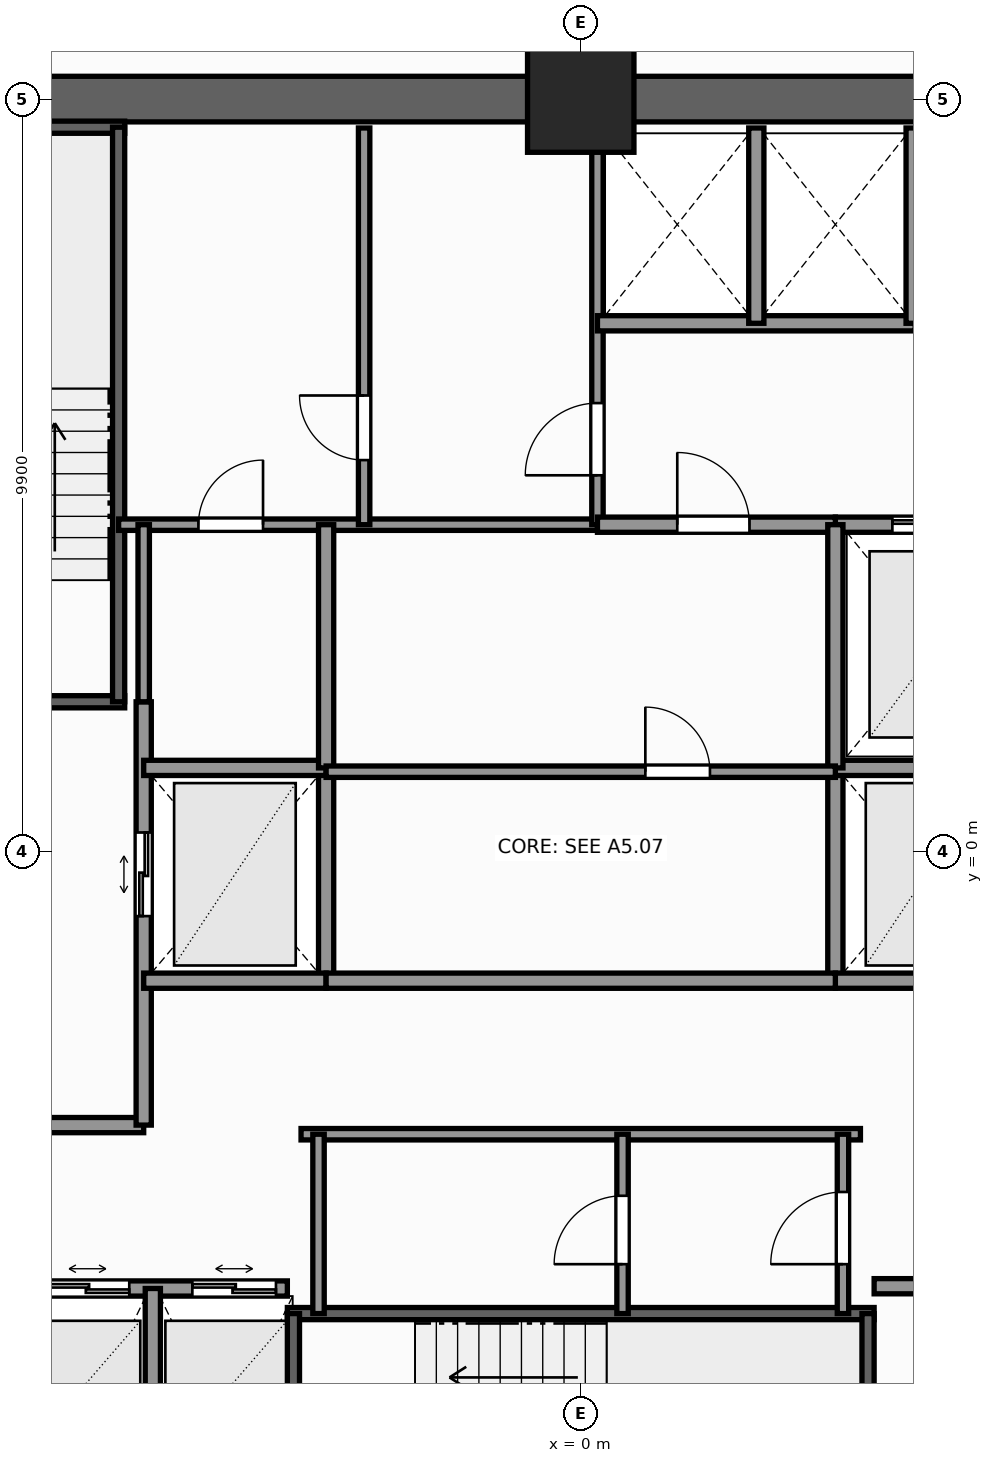
"""IFC4 building model, lengths in metres.
Left out: names, types, materials, properties, quantities, classifications, styles, units other than length and angle.
Written with IfcOpenShell. Run it as: python <this file> out.ifc"""

import sys

from ifc_helpers import new_model, si_unit, direction, frame, frame_2d, origin, origin_2d, place, context, subcontext, project, spatial, rectangle, extrude, element, fill, save


model = new_model("IFC4")
c1 = context("Model", 3, precision=1e-05, world=origin(), true_north=direction((0.0, 1.0)))
c2 = subcontext(c1, "Body", "Model", "MODEL_VIEW")
j1 = project(units=[si_unit("LENGTHUNIT", "METRE"), si_unit("PLANEANGLEUNIT", "RADIAN")], contexts=[c1])
p1 = place(None, origin())
s1 = spatial("IfcSite", under=j1, at=p1, CompositionType="ELEMENT")
p2 = place(p1, origin())
s2 = spatial("IfcBuilding", under=s1, at=p2, CompositionType="ELEMENT")
p3 = place(p2, frame((0.0, 0.0, 92.0)))
s3 = spatial("IfcBuildingStorey", under=s2, at=p3, CompositionType="ELEMENT", Elevation=92.0)
p4 = place(p3, frame((-10.2, 9.9, 0.0), z_axis=(0.0, 0.0, 1.0), x_axis=(1.0, 0.0, 0.0)))
e1 = element("IfcWall", 1, at=p4, inside=s3, PredefinedType="SHEAR", context=c2, shape_type="SweptSolid", body=[
    extrude(rectangle(XDim=14.62, YDim=0.6, at=frame_2d((7.31, 0.0))), origin(), (0.0, 0.0, 1.0), 3.3),
])
p5 = place(p3, frame((0.0, 9.9, 0.0), z_axis=(0.0, 0.0, 1.0), x_axis=(1.0, 0.0, 0.0)))
e2 = element("IfcColumn", 2, at=p5, inside=s3, PredefinedType="COLUMN", context=c2, shape_type="SweptSolid", body=[
    extrude(rectangle(XDim=1.4, YDim=1.4, at=origin_2d()), origin(), (0.0, 0.0, 1.0), 3.3),
])
p6 = place(p3, frame((-9.52, 1.97, 0.0), z_axis=(0.0, 0.0, 1.0), x_axis=(1.0, 0.0, 0.0)))
e3 = element("IfcWall", 3, at=p6, inside=s3, PredefinedType="SHEAR", context=c2, shape_type="SweptSolid", body=[
    extrude(rectangle(XDim=3.52, YDim=0.16, at=frame_2d((1.76, 0.0))), origin(), (0.0, 0.0, 1.0), 3.3),
])
p7 = place(p6, frame((1.15, 0.0, 0.0)))
e4 = element("IfcOpeningElement", 4, at=p7, cuts=e3, PredefinedType="OPENING", context=c2, shape_type="SweptSolid", body=[
    extrude(rectangle(XDim=1.1, YDim=2.2, at=frame_2d((0.55, 1.1))), frame((0.0, 0.09, 0.0), z_axis=(0.0, -1.0, 0.0), x_axis=(1.0, 0.0, 0.0)), (0.0, 0.0, 1.0), 0.18),
])
p8 = place(p3, frame((-9.52, 9.53, 0.0), z_axis=(0.0, 0.0, 1.0), x_axis=(1.0, 0.0, 0.0)))
e5 = element("IfcWall", 5, at=p8, inside=s3, PredefinedType="SHEAR", context=c2, shape_type="SweptSolid", body=[
    extrude(rectangle(XDim=3.52, YDim=0.16, at=frame_2d((1.76, 0.0))), origin(), (0.0, 0.0, 1.0), 3.3),
])
p9 = place(p3, frame((-6.08, 1.97, 0.0), z_axis=(0.0, 0.0, 1.0), x_axis=(0.0, 1.0, 0.0)))
e6 = element("IfcWall", 6, at=p9, inside=s3, PredefinedType="SHEAR", context=c2, shape_type="SweptSolid", body=[
    extrude(rectangle(XDim=7.56, YDim=0.16, at=frame_2d((3.78, 0.0))), origin(), (0.0, 0.0, 1.0), 3.3),
])
p10 = place(p3, frame((-3.86, -6.08, 0.0), z_axis=(0.0, 0.0, 1.0), x_axis=(1.0, 0.0, 0.0)))
e7 = element("IfcWall", 7, at=p10, inside=s3, PredefinedType="SHEAR", context=c2, shape_type="SweptSolid", body=[
    extrude(rectangle(XDim=7.72, YDim=0.16, at=frame_2d((3.86, 0.0))), origin(), (0.0, 0.0, 1.0), 3.3),
])
for number, where, z_axis, x_axis in (
    (8, (-3.78, -9.43, 0.0), (0.0, 0.0, 1.0), (0.0, 1.0, 0.0)),
    (9, (3.78, -9.43, 0.0), (0.0, 0.0, 1.0), (0.0, 1.0, 0.0)),
):
    element("IfcWall", number, at=place(p3, frame(where, z_axis=z_axis, x_axis=x_axis)), inside=s3, PredefinedType="SHEAR", context=c2, shape_type="SweptSolid", body=[
        extrude(rectangle(XDim=3.35, YDim=0.16, at=frame_2d((1.675, 0.0))), origin(), (0.0, 0.0, 1.0), 3.3),
    ])
p11 = place(p3, frame((-9.52, -3.6, 0.0), z_axis=(0.0, 0.0, 1.0), x_axis=(1.0, 0.0, 0.0)))
e10 = element("IfcWall", 10, at=p11, inside=s3, PredefinedType="SOLIDWALL", context=c2, shape_type="SweptSolid", body=[
    extrude(rectangle(XDim=3.77, YDim=0.2, at=frame_2d((1.885, 0.0))), origin(), (0.0, 0.0, 1.0), 3.08),
])
p12 = place(p11, frame((1.15, 0.0, 0.0)))
e11 = element("IfcOpeningElement", 11, at=p12, cuts=e10, PredefinedType="OPENING", context=c2, shape_type="SweptSolid", body=[
    extrude(rectangle(XDim=0.95, YDim=2.06, at=frame_2d((0.475, 1.03))), frame((0.0, 0.11, 0.0), z_axis=(0.0, -1.0, 0.0), x_axis=(1.0, 0.0, 0.0)), (0.0, 0.0, 1.0), 0.22),
])
p13 = place(p3, frame((-5.75, -3.6, 0.0), z_axis=(0.0, 0.0, 1.0), x_axis=(0.0, 1.0, 0.0)))
e12 = element("IfcWall", 12, at=p13, inside=s3, PredefinedType="SOLIDWALL", context=c2, shape_type="SweptSolid", body=[
    extrude(rectangle(XDim=5.57, YDim=0.2, at=frame_2d((2.785, 0.0))), origin(), (0.0, 0.0, 1.0), 3.08),
])
p14 = place(p13, frame((2.75, 0.0, 0.0)))
e13 = element("IfcOpeningElement", 13, at=p14, cuts=e12, PredefinedType="OPENING", context=c2, shape_type="SweptSolid", body=[
    extrude(rectangle(XDim=1.1, YDim=2.2, at=frame_2d((0.55, 1.1))), frame((0.0, 0.11, 0.0), z_axis=(0.0, -1.0, 0.0), x_axis=(1.0, 0.0, 0.0)), (0.0, 0.0, 1.0), 0.22),
])
p15 = place(p3, frame((-3.35, -1.7, 0.0), z_axis=(0.0, 0.0, 1.0), x_axis=(0.0, 1.0, 0.0)))
e14 = element("IfcWall", 14, at=p15, inside=s3, PredefinedType="SOLIDWALL", context=c2, shape_type="SweptSolid", body=[
    extrude(rectangle(XDim=2.8, YDim=0.2, at=frame_2d((1.4, 0.0))), origin(), (0.0, 0.0, 1.0), 3.08),
])
for number, where, z_axis, x_axis in (
    (15, (-5.75, -1.7, 0.0), (0.0, 0.0, 1.0), (1.0, 0.0, 0.0)),
    (16, (-5.75, 1.1, 0.0), (0.0, 0.0, 1.0), (1.0, 0.0, 0.0)),
):
    element("IfcWall", number, at=place(p3, frame(where, z_axis=z_axis, x_axis=x_axis)), inside=s3, PredefinedType="SOLIDWALL", context=c2, shape_type="SweptSolid", body=[
        extrude(rectangle(XDim=2.4, YDim=0.2, at=frame_2d((1.2, 0.0))), origin(), (0.0, 0.0, 1.0), 3.08),
    ])
p16 = place(p3, frame((3.35, -1.7, 0.0), z_axis=(0.0, 0.0, 1.0), x_axis=(0.0, 1.0, 0.0)))
e17 = element("IfcWall", 17, at=p16, inside=s3, PredefinedType="SOLIDWALL", context=c2, shape_type="SweptSolid", body=[
    extrude(rectangle(XDim=2.8, YDim=0.2, at=frame_2d((1.4, 0.0))), origin(), (0.0, 0.0, 1.0), 3.08),
])
for number, where, z_axis, x_axis in (
    (18, (3.35, -1.7, 0.0), (0.0, 0.0, 1.0), (1.0, 0.0, 0.0)),
    (19, (3.35, 1.1, 0.0), (0.0, 0.0, 1.0), (1.0, 0.0, 0.0)),
):
    element("IfcWall", number, at=place(p3, frame(where, z_axis=z_axis, x_axis=x_axis)), inside=s3, PredefinedType="SOLIDWALL", context=c2, shape_type="SweptSolid", body=[
        extrude(rectangle(XDim=2.4, YDim=0.2, at=frame_2d((1.2, 0.0))), origin(), (0.0, 0.0, 1.0), 3.08),
    ])
p17 = place(p3, frame((3.35, 4.3, 0.0), z_axis=(0.0, 0.0, 1.0), x_axis=(1.0, 0.0, 0.0)))
e20 = element("IfcWall", 20, at=p17, inside=s3, PredefinedType="SOLIDWALL", context=c2, shape_type="SweptSolid", body=[
    extrude(rectangle(XDim=2.73, YDim=0.2, at=frame_2d((1.365, 0.0))), origin(), (0.0, 0.0, 1.0), 3.08),
])
p18 = place(p17, frame((0.75, 0.0, 0.0)))
e21 = element("IfcOpeningElement", 21, at=p18, cuts=e20, PredefinedType="OPENING", context=c2, shape_type="SweptSolid", body=[
    extrude(rectangle(XDim=1.2, YDim=2.25, at=frame_2d((0.6, 1.125))), frame((0.0, 0.11, 0.0), z_axis=(0.0, -1.0, 0.0), x_axis=(1.0, 0.0, 0.0)), (0.0, 0.0, 1.0), 0.22),
])
p19 = place(p3, frame((-6.08, 4.3, 0.0), z_axis=(0.0, 0.0, 1.0), x_axis=(1.0, 0.0, 0.0)))
e22 = element("IfcWall", 22, at=p19, inside=s3, PredefinedType="PARTITIONING", context=c2, shape_type="SweptSolid", body=[
    extrude(rectangle(XDim=6.3, YDim=0.15, at=frame_2d((3.15, 0.0))), origin(), (0.0, 0.0, 1.0), 3.08),
])
p20 = place(p19, frame((1.05, 0.0, 0.0)))
e23 = element("IfcOpeningElement", 23, at=p20, cuts=e22, PredefinedType="OPENING", context=c2, shape_type="SweptSolid", body=[
    extrude(rectangle(XDim=0.85, YDim=2.03, at=frame_2d((0.425, 1.015))), frame((0.0, 0.085, 0.0), z_axis=(0.0, -1.0, 0.0), x_axis=(1.0, 0.0, 0.0)), (0.0, 0.0, 1.0), 0.17),
])
p21 = place(p3, frame((0.22, 4.3, 0.0), z_axis=(0.0, 0.0, 1.0), x_axis=(0.0, 1.0, 0.0)))
e24 = element("IfcWall", 24, at=p21, inside=s3, PredefinedType="PARTITIONING", context=c2, shape_type="SweptSolid", body=[
    extrude(rectangle(XDim=5.22, YDim=0.15, at=frame_2d((2.61, 0.0))), origin(), (0.0, 0.0, 1.0), 3.08),
])
p22 = place(p21, frame((0.65, 0.0, 0.0)))
e25 = element("IfcOpeningElement", 25, at=p22, cuts=e24, PredefinedType="OPENING", context=c2, shape_type="SweptSolid", body=[
    extrude(rectangle(XDim=0.95, YDim=2.06, at=frame_2d((0.475, 1.03))), frame((0.0, 0.085, 0.0), z_axis=(0.0, -1.0, 0.0), x_axis=(1.0, 0.0, 0.0)), (0.0, 0.0, 1.0), 0.17),
])
p23 = place(p3, frame((-2.85, 4.3, 0.0), z_axis=(0.0, 0.0, 1.0), x_axis=(0.0, 1.0, 0.0)))
e26 = element("IfcWall", 26, at=p23, inside=s3, PredefinedType="PARTITIONING", context=c2, shape_type="SweptSolid", body=[
    extrude(rectangle(XDim=5.22, YDim=0.15, at=frame_2d((2.61, 0.0))), origin(), (0.0, 0.0, 1.0), 3.08),
])
p24 = place(p23, frame((0.85, 0.0, 0.0)))
e27 = element("IfcOpeningElement", 27, at=p24, cuts=e26, PredefinedType="OPENING", context=c2, shape_type="SweptSolid", body=[
    extrude(rectangle(XDim=0.85, YDim=2.03, at=frame_2d((0.425, 1.015))), frame((0.0, 0.085, 0.0), z_axis=(0.0, -1.0, 0.0), x_axis=(1.0, 0.0, 0.0)), (0.0, 0.0, 1.0), 0.17),
])
p25 = place(p3, frame((0.22, 6.95, 0.0), z_axis=(0.0, 0.0, 1.0), x_axis=(1.0, 0.0, 0.0)))
e28 = element("IfcWall", 28, at=p25, inside=s3, PredefinedType="SOLIDWALL", context=c2, shape_type="SweptSolid", body=[
    extrude(rectangle(XDim=4.18, YDim=0.2, at=frame_2d((2.09, 0.0))), origin(), (0.0, 0.0, 1.0), 3.08),
])
for number, where, z_axis, x_axis in (
    (29, (4.38, 6.95, 0.0), (0.0, 0.0, 1.0), (0.0, 1.0, 0.0)),
    (30, (2.31, 6.95, 0.0), (0.0, 0.0, 1.0), (0.0, 1.0, 0.0)),
):
    element("IfcWall", number, at=place(p3, frame(where, z_axis=z_axis, x_axis=x_axis)), inside=s3, PredefinedType="SOLIDWALL", context=c2, shape_type="SweptSolid", body=[
        extrude(rectangle(XDim=2.57, YDim=0.2, at=frame_2d((1.285, 0.0))), origin(), (0.0, 0.0, 1.0), 3.08),
    ])
p26 = place(p3, frame((-9.52, -5.75, 0.0), z_axis=(0.0, 0.0, 1.0), x_axis=(1.0, 0.0, 0.0)))
e31 = element("IfcWall", 31, at=p26, inside=s3, PredefinedType="SOLIDWALL", context=c2, shape_type="SweptSolid", body=[
    extrude(rectangle(XDim=5.66, YDim=0.2, at=frame_2d((2.83, 0.0))), origin(), (0.0, 0.0, 1.0), 3.08),
])
p27 = place(p26, frame((0.55, 0.0, 0.0)))
e32 = element("IfcOpeningElement", 32, at=p27, cuts=e31, PredefinedType="OPENING", context=c2, shape_type="SweptSolid", body=[
    extrude(rectangle(XDim=1.1, YDim=2.2, at=frame_2d((0.55, 1.1))), frame((0.0, 0.11, 0.0), z_axis=(0.0, -1.0, 0.0), x_axis=(1.0, 0.0, 0.0)), (0.0, 0.0, 1.0), 0.22),
])
p28 = place(p26, frame((2.48, 0.0, 0.0)))
e33 = element("IfcOpeningElement", 33, at=p28, cuts=e31, PredefinedType="OPENING", context=c2, shape_type="SweptSolid", body=[
    extrude(rectangle(XDim=1.1, YDim=2.2, at=frame_2d((0.55, 1.1))), frame((0.0, 0.11, 0.0), z_axis=(0.0, -1.0, 0.0), x_axis=(1.0, 0.0, 0.0)), (0.0, 0.0, 1.0), 0.22),
])
p29 = place(p26, frame((4.41, 0.0, 0.0)))
e34 = element("IfcOpeningElement", 34, at=p29, cuts=e31, PredefinedType="OPENING", context=c2, shape_type="SweptSolid", body=[
    extrude(rectangle(XDim=1.1, YDim=2.2, at=frame_2d((0.55, 1.1))), frame((0.0, 0.11, 0.0), z_axis=(0.0, -1.0, 0.0), x_axis=(1.0, 0.0, 0.0)), (0.0, 0.0, 1.0), 0.22),
])
p30 = place(p3, frame((-5.63, -9.52, 0.0), z_axis=(0.0, 0.0, 1.0), x_axis=(0.0, 1.0, 0.0)))
e35 = element("IfcWall", 35, at=p30, inside=s3, PredefinedType="SOLIDWALL", context=c2, shape_type="SweptSolid", body=[
    extrude(rectangle(XDim=3.77, YDim=0.2, at=frame_2d((1.885, 0.0))), origin(), (0.0, 0.0, 1.0), 3.08),
])
p31 = place(p3, frame((3.86, -5.72, 0.0), z_axis=(0.0, 0.0, 1.0), x_axis=(1.0, 0.0, 0.0)))
e36 = element("IfcWall", 36, at=p31, inside=s3, PredefinedType="SOLIDWALL", context=c2, shape_type="SweptSolid", body=[
    extrude(rectangle(XDim=5.66, YDim=0.2, at=frame_2d((2.83, 0.0))), origin(), (0.0, 0.0, 1.0), 3.08),
])
p32 = place(p31, frame((0.85, 0.0, 0.0)))
e37 = element("IfcOpeningElement", 37, at=p32, cuts=e36, PredefinedType="OPENING", context=c2, shape_type="SweptSolid", body=[
    extrude(rectangle(XDim=0.95, YDim=2.06, at=frame_2d((0.475, 1.03))), frame((0.0, 0.11, 0.0), z_axis=(0.0, -1.0, 0.0), x_axis=(1.0, 0.0, 0.0)), (0.0, 0.0, 1.0), 0.22),
])
p33 = place(p3, frame((0.22, 4.3, 0.0), z_axis=(0.0, 0.0, 1.0), x_axis=(1.0, 0.0, 0.0)))
e38 = element("IfcWall", 38, at=p33, inside=s3, PredefinedType="SOLIDWALL", context=c2, shape_type="SweptSolid", body=[
    extrude(rectangle(XDim=3.13, YDim=0.2, at=frame_2d((1.565, 0.0))), origin(), (0.0, 0.0, 1.0), 3.08),
])
p34 = place(p33, frame((1.05, 0.0, 0.0)))
e39 = element("IfcOpeningElement", 39, at=p34, cuts=e38, PredefinedType="OPENING", context=c2, shape_type="SweptSolid", body=[
    extrude(rectangle(XDim=0.95, YDim=2.06, at=frame_2d((0.475, 1.03))), frame((0.0, 0.11, 0.0), z_axis=(0.0, -1.0, 0.0), x_axis=(1.0, 0.0, 0.0)), (0.0, 0.0, 1.0), 0.22),
])
p35 = place(p3, frame((-3.35, -1.7, 0.0), z_axis=(0.0, 0.0, 1.0), x_axis=(1.0, 0.0, 0.0)))
e40 = element("IfcWall", 40, at=p35, inside=s3, PredefinedType="SOLIDWALL", context=c2, shape_type="SweptSolid", body=[
    extrude(rectangle(XDim=6.7, YDim=0.2, at=frame_2d((3.35, 0.0))), origin(), (0.0, 0.0, 1.0), 3.08),
])
for number, where, z_axis, x_axis in (
    (41, (-3.35, 1.1, 0.0), (0.0, 0.0, 1.0), (0.0, 1.0, 0.0)),
    (42, (3.35, 1.1, 0.0), (0.0, 0.0, 1.0), (0.0, 1.0, 0.0)),
):
    element("IfcWall", number, at=place(p3, frame(where, z_axis=z_axis, x_axis=x_axis)), inside=s3, PredefinedType="SOLIDWALL", context=c2, shape_type="SweptSolid", body=[
        extrude(rectangle(XDim=3.2, YDim=0.2, at=frame_2d((1.6, 0.0))), origin(), (0.0, 0.0, 1.0), 3.08),
    ])
p36 = place(p3, frame((-3.35, 1.05, 0.0), z_axis=(0.0, 0.0, 1.0), x_axis=(1.0, 0.0, 0.0)))
e43 = element("IfcWall", 43, at=p36, inside=s3, PredefinedType="PARTITIONING", context=c2, shape_type="SweptSolid", body=[
    extrude(rectangle(XDim=6.7, YDim=0.15, at=frame_2d((3.35, 0.0))), origin(), (0.0, 0.0, 1.0), 3.08),
])
p37 = place(p36, frame((4.2, 0.0, 0.0)))
e44 = element("IfcOpeningElement", 44, at=p37, cuts=e43, PredefinedType="OPENING", context=c2, shape_type="SweptSolid", body=[
    extrude(rectangle(XDim=0.85, YDim=2.03, at=frame_2d((0.425, 1.015))), frame((0.0, 0.085, 0.0), z_axis=(0.0, -1.0, 0.0), x_axis=(1.0, 0.0, 0.0)), (0.0, 0.0, 1.0), 0.17),
])
p38 = place(p3, frame((-3.68, -3.72, 0.0), z_axis=(0.0, 0.0, 1.0), x_axis=(1.0, 0.0, 0.0)))
e45 = element("IfcWall", 45, at=p38, inside=s3, PredefinedType="PARTITIONING", context=c2, shape_type="SweptSolid", body=[
    extrude(rectangle(XDim=7.36, YDim=0.15, at=frame_2d((3.68, 0.0))), origin(), (0.0, 0.0, 1.0), 3.08),
])
p39 = place(p3, frame((3.45, -6.08, 0.0), z_axis=(0.0, 0.0, 1.0), x_axis=(0.0, 1.0, 0.0)))
e46 = element("IfcWall", 46, at=p39, inside=s3, PredefinedType="PARTITIONING", context=c2, shape_type="SweptSolid", body=[
    extrude(rectangle(XDim=2.36, YDim=0.15, at=frame_2d((1.18, 0.0))), origin(), (0.0, 0.0, 1.0), 3.08),
])
p40 = place(p39, frame((0.65, 0.0, 0.0)))
e47 = element("IfcOpeningElement", 47, at=p40, cuts=e46, PredefinedType="OPENING", context=c2, shape_type="SweptSolid", body=[
    extrude(rectangle(XDim=0.95, YDim=2.06, at=frame_2d((0.475, 1.03))), frame((0.0, 0.085, 0.0), z_axis=(0.0, -1.0, 0.0), x_axis=(1.0, 0.0, 0.0)), (0.0, 0.0, 1.0), 0.17),
])
p41 = place(p3, frame((-3.45, -6.08, 0.0), z_axis=(0.0, 0.0, 1.0), x_axis=(0.0, 1.0, 0.0)))
e48 = element("IfcWall", 48, at=p41, inside=s3, PredefinedType="PARTITIONING", context=c2, shape_type="SweptSolid", body=[
    extrude(rectangle(XDim=2.36, YDim=0.15, at=frame_2d((1.18, 0.0))), origin(), (0.0, 0.0, 1.0), 3.08),
])
p42 = place(p3, frame((0.55, -6.08, 0.0), z_axis=(0.0, 0.0, 1.0), x_axis=(0.0, 1.0, 0.0)))
e49 = element("IfcWall", 49, at=p42, inside=s3, PredefinedType="PARTITIONING", context=c2, shape_type="SweptSolid", body=[
    extrude(rectangle(XDim=2.36, YDim=0.15, at=frame_2d((1.18, 0.0))), origin(), (0.0, 0.0, 1.0), 3.08),
])
p43 = place(p42, frame((0.65, 0.0, 0.0)))
e50 = element("IfcOpeningElement", 50, at=p43, cuts=e49, PredefinedType="OPENING", context=c2, shape_type="SweptSolid", body=[
    extrude(rectangle(XDim=0.9, YDim=2.06, at=frame_2d((0.45, 1.03))), frame((0.0, 0.085, 0.0), z_axis=(0.0, -1.0, 0.0), x_axis=(1.0, 0.0, 0.0)), (0.0, 0.0, 1.0), 0.17),
])
p44 = place(p3, frame((-5.75, 1.97, 0.0), z_axis=(0.0, 0.0, 1.0), x_axis=(0.0, 1.0, 0.0)))
e51 = element("IfcWall", 51, at=p44, inside=s3, PredefinedType="PARTITIONING", context=c2, shape_type="SweptSolid", body=[
    extrude(rectangle(XDim=2.33, YDim=0.15, at=frame_2d((1.165, 0.0))), origin(), (0.0, 0.0, 1.0), 3.08),
])
p45 = place(p14, origin())
e52 = element("IfcDoor", 52, at=p45, inside=s3, OperationType="DOUBLE_DOOR_SLIDING", PredefinedType="DOOR", context=c2, shape_type="SweptSolid", body=[
    extrude(rectangle(XDim=1.1, YDim=2.2, at=frame_2d((0.55, 1.1))), frame((0.0, 0.025, 0.0), z_axis=(0.0, -1.0, 0.0), x_axis=(1.0, 0.0, 0.0)), (0.0, 0.0, 1.0), 0.05),
])
fill(e13, e52)
p46 = place(p18, origin())
e53 = element("IfcDoor", 53, at=p46, inside=s3, OperationType="DOUBLE_DOOR_SLIDING", PredefinedType="DOOR", context=c2, shape_type="SweptSolid", body=[
    extrude(rectangle(XDim=1.2, YDim=2.25, at=frame_2d((0.6, 1.125))), frame((0.0, 0.025, 0.0), z_axis=(0.0, -1.0, 0.0), x_axis=(1.0, 0.0, 0.0)), (0.0, 0.0, 1.0), 0.05),
])
fill(e21, e53)
p47 = place(p22, origin())
e54 = element("IfcDoor", 54, at=p47, inside=s3, OperationType="SINGLE_SWING_LEFT", PredefinedType="DOOR", context=c2, shape_type="SweptSolid", body=[
    extrude(rectangle(XDim=0.95, YDim=2.06, at=frame_2d((0.475, 1.03))), frame((0.0, 0.025, 0.0), z_axis=(0.0, -1.0, 0.0), x_axis=(1.0, 0.0, 0.0)), (0.0, 0.0, 1.0), 0.05),
])
fill(e25, e54)
p48 = place(p24, origin())
e55 = element("IfcDoor", 55, at=p48, inside=s3, OperationType="SINGLE_SWING_RIGHT", PredefinedType="DOOR", context=c2, shape_type="SweptSolid", body=[
    extrude(rectangle(XDim=0.85, YDim=2.03, at=frame_2d((0.425, 1.015))), frame((0.0, 0.025, 0.0), z_axis=(0.0, -1.0, 0.0), x_axis=(1.0, 0.0, 0.0)), (0.0, 0.0, 1.0), 0.05),
])
fill(e27, e55)
p49 = place(p28, origin())
e56 = element("IfcDoor", 56, at=p49, inside=s3, OperationType="DOUBLE_DOOR_SLIDING", PredefinedType="DOOR", context=c2, shape_type="SweptSolid", body=[
    extrude(rectangle(XDim=1.1, YDim=2.2, at=frame_2d((0.55, 1.1))), frame((0.0, 0.025, 0.0), z_axis=(0.0, -1.0, 0.0), x_axis=(1.0, 0.0, 0.0)), (0.0, 0.0, 1.0), 0.05),
])
fill(e33, e56)
p50 = place(p29, origin())
e57 = element("IfcDoor", 57, at=p50, inside=s3, OperationType="DOUBLE_DOOR_SLIDING", PredefinedType="DOOR", context=c2, shape_type="SweptSolid", body=[
    extrude(rectangle(XDim=1.1, YDim=2.2, at=frame_2d((0.55, 1.1))), frame((0.0, 0.025, 0.0), z_axis=(0.0, -1.0, 0.0), x_axis=(1.0, 0.0, 0.0)), (0.0, 0.0, 1.0), 0.05),
])
fill(e34, e57)
p51 = place(p34, origin())
e58 = element("IfcDoor", 58, at=p51, inside=s3, OperationType="SINGLE_SWING_LEFT", PredefinedType="DOOR", context=c2, shape_type="SweptSolid", body=[
    extrude(rectangle(XDim=0.95, YDim=2.06, at=frame_2d((0.475, 1.03))), frame((0.0, 0.025, 0.0), z_axis=(0.0, -1.0, 0.0), x_axis=(1.0, 0.0, 0.0)), (0.0, 0.0, 1.0), 0.05),
])
fill(e39, e58)
p52 = place(p37, origin())
e59 = element("IfcDoor", 59, at=p52, inside=s3, OperationType="SINGLE_SWING_LEFT", PredefinedType="DOOR", context=c2, shape_type="SweptSolid", body=[
    extrude(rectangle(XDim=0.85, YDim=2.03, at=frame_2d((0.425, 1.015))), frame((0.0, 0.025, 0.0), z_axis=(0.0, -1.0, 0.0), x_axis=(1.0, 0.0, 0.0)), (0.0, 0.0, 1.0), 0.05),
])
fill(e44, e59)
p53 = place(p40, origin())
e60 = element("IfcDoor", 60, at=p53, inside=s3, OperationType="SINGLE_SWING_LEFT", PredefinedType="DOOR", context=c2, shape_type="SweptSolid", body=[
    extrude(rectangle(XDim=0.95, YDim=2.06, at=frame_2d((0.475, 1.03))), frame((0.0, 0.025, 0.0), z_axis=(0.0, -1.0, 0.0), x_axis=(1.0, 0.0, 0.0)), (0.0, 0.0, 1.0), 0.05),
])
fill(e47, e60)
p54 = place(p43, origin())
e61 = element("IfcDoor", 61, at=p54, inside=s3, OperationType="SINGLE_SWING_LEFT", PredefinedType="DOOR", context=c2, shape_type="SweptSolid", body=[
    extrude(rectangle(XDim=0.9, YDim=2.06, at=frame_2d((0.45, 1.03))), frame((0.0, 0.025, 0.0), z_axis=(0.0, -1.0, 0.0), x_axis=(1.0, 0.0, 0.0)), (0.0, 0.0, 1.0), 0.05),
])
fill(e50, e61)
p55 = place(p20, origin())
e62 = element("IfcDoor", 62, at=p55, inside=s3, OperationType="SINGLE_SWING_RIGHT", PredefinedType="DOOR", context=c2, shape_type="SweptSolid", body=[
    extrude(rectangle(XDim=0.85, YDim=2.03, at=frame_2d((0.425, 1.015))), frame((0.0, 0.025, 0.0), z_axis=(0.0, -1.0, 0.0), x_axis=(1.0, 0.0, 0.0)), (0.0, 0.0, 1.0), 0.05),
])
fill(e23, e62)
save(model, sys.argv[1])
